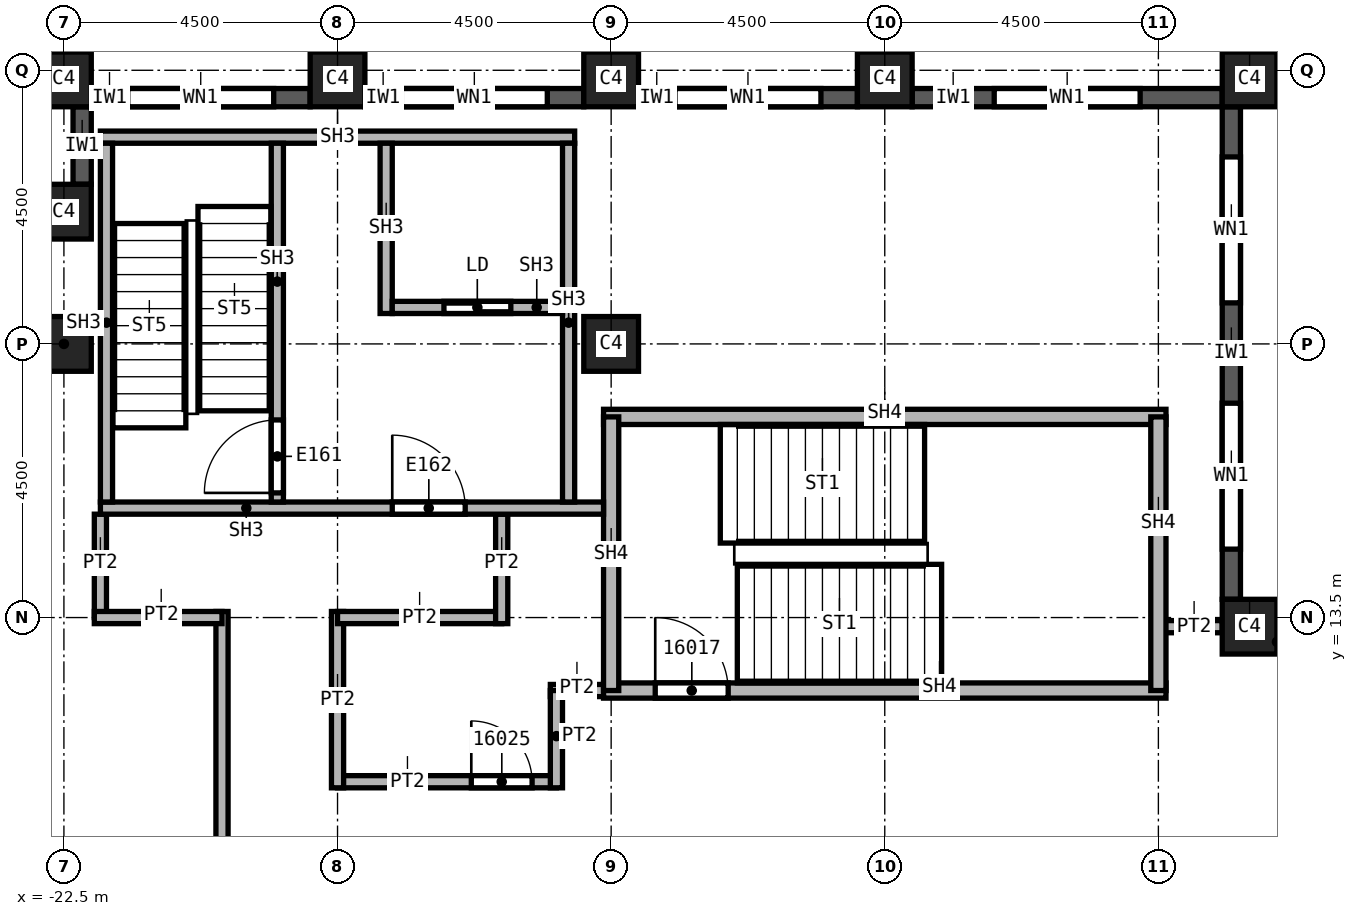
"""IFC4 building model, lengths in metres.
Left out: names, types, materials, properties, quantities, classifications, styles, units other than length and angle.
Written with IfcOpenShell. Run it as: python <this file> out.ifc"""

import sys

from ifc_helpers import new_model, si_unit, direction, frame, frame_2d, origin, origin_2d, place, context, subcontext, project, spatial, rectangle, extrude, element, fill, save


model = new_model("IFC4")
c1 = context("Model", 3, precision=1e-05, world=origin(), true_north=direction((0.0, 1.0)))
c2 = subcontext(c1, "Body", "Model", "MODEL_VIEW")
j1 = project(units=[si_unit("LENGTHUNIT", "METRE"), si_unit("PLANEANGLEUNIT", "RADIAN")], contexts=[c1])
p1 = place(None, origin())
s1 = spatial("IfcSite", under=j1, at=p1, CompositionType="ELEMENT")
p2 = place(p1, origin())
s2 = spatial("IfcBuilding", under=s1, at=p2, CompositionType="ELEMENT")
p3 = place(p2, frame((0.0, 0.0, 246.0)))
s3 = spatial("IfcBuildingStorey", under=s2, at=p3, CompositionType="ELEMENT", Elevation=246.0)
for number, where, z_axis, x_axis in (
    (1, (-13.5, 18.0, 0.0), (0.0, 0.0, 1.0), (1.0, 0.0, 0.0)),
    (2, (-22.5, 18.0, 0.0), (0.0, 0.0, 1.0), (1.0, 0.0, 0.0)),
    (3, (-3.0, 22.35, 0.0), (0.0, 0.0, 1.0), (1.0, 0.0, 0.0)),
    (4, (-9.0, 22.35, 0.0), (0.0, 0.0, 1.0), (1.0, 0.0, 0.0)),
    (5, (-13.5, 22.35, 0.0), (0.0, 0.0, 1.0), (1.0, 0.0, 0.0)),
    (6, (-18.0, 22.35, 0.0), (0.0, 0.0, 1.0), (1.0, 0.0, 0.0)),
    (7, (-22.5, 22.35, 0.0), (0.0, 0.0, 1.0), (1.0, 0.0, 0.0)),
    (8, (-3.0, 13.35, 0.0), (0.0, 0.0, 1.0), (1.0, 0.0, 0.0)),
    (9, (-22.5, 20.175, 0.0), (0.0, 0.0, 1.0), (1.0, 0.0, 0.0)),
):
    element("IfcColumn", number, at=place(p3, frame(where, z_axis=z_axis, x_axis=x_axis)), inside=s3, PredefinedType="COLUMN", context=c2, shape_type="SweptSolid", body=[
        extrude(rectangle(XDim=0.9, YDim=0.9, at=origin_2d()), origin(), (0.0, 0.0, 1.0), 3.72),
    ])
p4 = place(p3, frame((-3.3, 13.8, 0.0), z_axis=(0.0, 0.0, 1.0), x_axis=(0.0, 1.0, 0.0)))
e10 = element("IfcWall", 10, at=p4, inside=s3, PredefinedType="SOLIDWALL", context=c2, shape_type="SweptSolid", body=[
    extrude(rectangle(XDim=8.1, YDim=0.3, at=frame_2d((4.05, 0.0))), origin(), (0.0, 0.0, 1.0), 3.12),
])
p5 = place(p4, frame((0.825, 0.0, 0.8)))
e11 = element("IfcOpeningElement", 11, at=p5, cuts=e10, PredefinedType="OPENING", context=c2, shape_type="SweptSolid", body=[
    extrude(rectangle(XDim=2.4, YDim=1.95, at=frame_2d((1.2, 0.975))), frame((0.0, 0.15, 0.0), z_axis=(0.0, -1.0, 0.0), x_axis=(1.0, 0.0, 0.0)), (0.0, 0.0, 1.0), 0.3),
])
p6 = place(p4, frame((4.875, 0.0, 0.8)))
e12 = element("IfcOpeningElement", 12, at=p6, cuts=e10, PredefinedType="OPENING", context=c2, shape_type="SweptSolid", body=[
    extrude(rectangle(XDim=2.4, YDim=1.95, at=frame_2d((1.2, 0.975))), frame((0.0, 0.15, 0.0), z_axis=(0.0, -1.0, 0.0), x_axis=(1.0, 0.0, 0.0)), (0.0, 0.0, 1.0), 0.3),
])
p7 = place(p3, frame((-3.45, 22.05, 0.0), z_axis=(0.0, 0.0, 1.0), x_axis=(-1.0, 0.0, 0.0)))
e13 = element("IfcWall", 13, at=p7, inside=s3, PredefinedType="SOLIDWALL", context=c2, shape_type="SweptSolid", body=[
    extrude(rectangle(XDim=5.1, YDim=0.3, at=frame_2d((2.55, 0.0))), origin(), (0.0, 0.0, 1.0), 3.12),
])
p8 = place(p7, frame((1.35, 0.0, 0.8)))
e14 = element("IfcOpeningElement", 14, at=p8, cuts=e13, PredefinedType="OPENING", context=c2, shape_type="SweptSolid", body=[
    extrude(rectangle(XDim=2.4, YDim=1.95, at=frame_2d((1.2, 0.975))), frame((0.0, 0.15, 0.0), z_axis=(0.0, -1.0, 0.0), x_axis=(1.0, 0.0, 0.0)), (0.0, 0.0, 1.0), 0.3),
])
p9 = place(p3, frame((-9.45, 22.05, 0.0), z_axis=(0.0, 0.0, 1.0), x_axis=(-1.0, 0.0, 0.0)))
e15 = element("IfcWall", 15, at=p9, inside=s3, PredefinedType="SOLIDWALL", context=c2, shape_type="SweptSolid", body=[
    extrude(rectangle(XDim=3.6, YDim=0.3, at=frame_2d((1.8, 0.0))), origin(), (0.0, 0.0, 1.0), 3.12),
])
p10 = place(p9, frame((0.6, 0.0, 0.8)))
e16 = element("IfcOpeningElement", 16, at=p10, cuts=e15, PredefinedType="OPENING", context=c2, shape_type="SweptSolid", body=[
    extrude(rectangle(XDim=2.4, YDim=1.95, at=frame_2d((1.2, 0.975))), frame((0.0, 0.15, 0.0), z_axis=(0.0, -1.0, 0.0), x_axis=(1.0, 0.0, 0.0)), (0.0, 0.0, 1.0), 0.3),
])
p11 = place(p3, frame((-13.95, 22.05, 0.0), z_axis=(0.0, 0.0, 1.0), x_axis=(-1.0, 0.0, 0.0)))
e17 = element("IfcWall", 17, at=p11, inside=s3, PredefinedType="SOLIDWALL", context=c2, shape_type="SweptSolid", body=[
    extrude(rectangle(XDim=3.6, YDim=0.3, at=frame_2d((1.8, 0.0))), origin(), (0.0, 0.0, 1.0), 3.12),
])
p12 = place(p11, frame((0.6, 0.0, 0.8)))
e18 = element("IfcOpeningElement", 18, at=p12, cuts=e17, PredefinedType="OPENING", context=c2, shape_type="SweptSolid", body=[
    extrude(rectangle(XDim=2.4, YDim=1.95, at=frame_2d((1.2, 0.975))), frame((0.0, 0.15, 0.0), z_axis=(0.0, -1.0, 0.0), x_axis=(1.0, 0.0, 0.0)), (0.0, 0.0, 1.0), 0.3),
])
p13 = place(p3, frame((-18.45, 22.05, 0.0), z_axis=(0.0, 0.0, 1.0), x_axis=(-1.0, 0.0, 0.0)))
e19 = element("IfcWall", 19, at=p13, inside=s3, PredefinedType="SOLIDWALL", context=c2, shape_type="SweptSolid", body=[
    extrude(rectangle(XDim=3.6, YDim=0.3, at=frame_2d((1.8, 0.0))), origin(), (0.0, 0.0, 1.0), 3.12),
])
p14 = place(p13, frame((0.6, 0.0, 0.8)))
e20 = element("IfcOpeningElement", 20, at=p14, cuts=e19, PredefinedType="OPENING", context=c2, shape_type="SweptSolid", body=[
    extrude(rectangle(XDim=2.4, YDim=1.95, at=frame_2d((1.2, 0.975))), frame((0.0, 0.15, 0.0), z_axis=(0.0, -1.0, 0.0), x_axis=(1.0, 0.0, 0.0)), (0.0, 0.0, 1.0), 0.3),
])
p15 = place(p3, frame((-22.2, 21.9, 0.0), z_axis=(0.0, 0.0, 1.0), x_axis=(0.0, -1.0, 0.0)))
e21 = element("IfcWall", 21, at=p15, inside=s3, PredefinedType="SOLIDWALL", context=c2, shape_type="SweptSolid", body=[
    extrude(rectangle(XDim=1.275, YDim=0.3, at=frame_2d((0.637, 0.0))), origin(), (0.0, 0.0, 1.0), 3.12),
])
p16 = place(p3, frame((-21.9, 13.5, 0.0), z_axis=(0.0, 0.0, 1.0), x_axis=(0.0, 1.0, 0.0)))
e22 = element("IfcWall", 22, at=p16, inside=s3, PredefinedType="PARTITIONING", context=c2, shape_type="SweptSolid", body=[
    extrude(rectangle(XDim=1.7, YDim=0.2, at=frame_2d((0.85, 0.0))), origin(), (0.0, 0.0, 1.0), 3.72),
])
p17 = place(p3, frame((-19.9, -21.9, 0.0), z_axis=(0.0, 0.0, 1.0), x_axis=(0.0, 1.0, 0.0)))
e23 = element("IfcWall", 23, at=p17, inside=s3, PredefinedType="PARTITIONING", context=c2, shape_type="SweptSolid", body=[
    extrude(rectangle(XDim=35.5, YDim=0.2, at=frame_2d((17.75, 0.0))), origin(), (0.0, 0.0, 1.0), 3.72),
])
p18 = place(p17, frame((22.95, 0.0, 0.0)))
e24 = element("IfcOpeningElement", 24, at=p18, cuts=e23, PredefinedType="OPENING", context=c2, shape_type="SweptSolid", body=[
    extrude(rectangle(XDim=1.0, YDim=2.1, at=frame_2d((0.5, 1.05))), frame((0.0, 0.1, 0.0), z_axis=(0.0, -1.0, 0.0), x_axis=(1.0, 0.0, 0.0)), (0.0, 0.0, 1.0), 0.2),
])
p19 = place(p17, frame((28.8, 0.0, 0.0)))
e25 = element("IfcOpeningElement", 25, at=p19, cuts=e23, PredefinedType="OPENING", context=c2, shape_type="SweptSolid", body=[
    extrude(rectangle(XDim=1.0, YDim=2.1, at=frame_2d((0.5, 1.05))), frame((0.0, 0.1, 0.0), z_axis=(0.0, -1.0, 0.0), x_axis=(1.0, 0.0, 0.0)), (0.0, 0.0, 1.0), 0.2),
])
p20 = place(p17, frame((7.75, 0.0, 0.0)))
e26 = element("IfcOpeningElement", 26, at=p20, cuts=e23, PredefinedType="OPENING", context=c2, shape_type="SweptSolid", body=[
    extrude(rectangle(XDim=1.0, YDim=2.1, at=frame_2d((0.5, 1.05))), frame((0.0, 0.1, 0.0), z_axis=(0.0, -1.0, 0.0), x_axis=(1.0, 0.0, 0.0)), (0.0, 0.0, 1.0), 0.2),
])
p21 = place(p17, frame((17.85, 0.0, 0.0)))
e27 = element("IfcOpeningElement", 27, at=p21, cuts=e23, PredefinedType="OPENING", context=c2, shape_type="SweptSolid", body=[
    extrude(rectangle(XDim=1.0, YDim=2.1, at=frame_2d((0.5, 1.05))), frame((0.0, 0.1, 0.0), z_axis=(0.0, -1.0, 0.0), x_axis=(1.0, 0.0, 0.0)), (0.0, 0.0, 1.0), 0.2),
])
p22 = place(p3, frame((-19.9, 13.5, 0.0), z_axis=(0.0, 0.0, 1.0), x_axis=(-1.0, 0.0, 0.0)))
e28 = element("IfcWall", 28, at=p22, inside=s3, PredefinedType="PARTITIONING", context=c2, shape_type="SweptSolid", body=[
    extrude(rectangle(XDim=2.1, YDim=0.2, at=frame_2d((1.05, 0.0))), origin(), (0.0, 0.0, 1.0), 3.72),
])
p23 = place(p3, frame((-18.0, 10.8, 0.0), z_axis=(0.0, 0.0, 1.0), x_axis=(1.0, 0.0, 0.0)))
e29 = element("IfcWall", 29, at=p23, inside=s3, PredefinedType="PARTITIONING", context=c2, shape_type="SweptSolid", body=[
    extrude(rectangle(XDim=3.6, YDim=0.2, at=frame_2d((1.8, 0.0))), origin(), (0.0, 0.0, 1.0), 3.72),
])
p24 = place(p23, frame((2.2, 0.0, 0.0)))
e30 = element("IfcOpeningElement", 30, at=p24, cuts=e29, PredefinedType="OPENING", context=c2, shape_type="SweptSolid", body=[
    extrude(rectangle(XDim=1.0, YDim=2.1, at=frame_2d((0.5, 1.05))), frame((0.0, 0.1, 0.0), z_axis=(0.0, -1.0, 0.0), x_axis=(1.0, 0.0, 0.0)), (0.0, 0.0, 1.0), 0.2),
])
p25 = place(p3, frame((-18.0, 13.6, 0.0), z_axis=(0.0, 0.0, 1.0), x_axis=(0.0, -1.0, 0.0)))
e31 = element("IfcWall", 31, at=p25, inside=s3, PredefinedType="PARTITIONING", context=c2, shape_type="SweptSolid", body=[
    extrude(rectangle(XDim=2.9, YDim=0.2, at=frame_2d((1.45, 0.0))), origin(), (0.0, 0.0, 1.0), 3.72),
])
p26 = place(p3, frame((-15.3, 13.5, 0.0), z_axis=(0.0, 0.0, 1.0), x_axis=(-1.0, 0.0, 0.0)))
e32 = element("IfcWall", 32, at=p26, inside=s3, PredefinedType="PARTITIONING", context=c2, shape_type="SweptSolid", body=[
    extrude(rectangle(XDim=2.7, YDim=0.2, at=frame_2d((1.35, 0.0))), origin(), (0.0, 0.0, 1.0), 3.72),
])
p27 = place(p3, frame((-15.3, 15.2, 0.0), z_axis=(0.0, 0.0, 1.0), x_axis=(0.0, -1.0, 0.0)))
e33 = element("IfcWall", 33, at=p27, inside=s3, PredefinedType="PARTITIONING", context=c2, shape_type="SweptSolid", body=[
    extrude(rectangle(XDim=1.8, YDim=0.2, at=frame_2d((0.9, 0.0))), origin(), (0.0, 0.0, 1.0), 3.72),
])
p28 = place(p3, frame((-14.5, 12.3, 0.0), z_axis=(0.0, 0.0, 1.0), x_axis=(1.0, 0.0, 0.0)))
e34 = element("IfcWall", 34, at=p28, inside=s3, PredefinedType="PARTITIONING", context=c2, shape_type="SweptSolid", body=[
    extrude(rectangle(XDim=1.125, YDim=0.2, at=frame_2d((0.562, 0.0))), origin(), (0.0, 0.0, 1.0), 3.72),
])
p29 = place(p3, frame((-14.4, 10.7, 0.0), z_axis=(0.0, 0.0, 1.0), x_axis=(0.0, 1.0, 0.0)))
e35 = element("IfcWall", 35, at=p29, inside=s3, PredefinedType="PARTITIONING", context=c2, shape_type="SweptSolid", body=[
    extrude(rectangle(XDim=1.6, YDim=0.2, at=frame_2d((0.8, 0.0))), origin(), (0.0, 0.0, 1.0), 3.72),
])
p30 = place(p3, frame((-4.5, 13.35, 0.0), z_axis=(0.0, 0.0, 1.0), x_axis=(1.0, 0.0, 0.0)))
e36 = element("IfcWall", 36, at=p30, inside=s3, PredefinedType="PARTITIONING", context=c2, shape_type="SweptSolid", body=[
    extrude(rectangle(XDim=1.05, YDim=0.2, at=frame_2d((0.525, 0.0))), origin(), (0.0, 0.0, 1.0), 3.72),
])
p31 = place(p3, frame((-13.625, 12.3, 0.0), z_axis=(0.0, 0.0, 1.0), x_axis=(1.0, 0.0, 0.0)))
e37 = element("IfcWall", 37, at=p31, inside=s3, PredefinedType="SOLIDWALL", context=c2, shape_type="SweptSolid", body=[
    extrude(rectangle(XDim=9.25, YDim=0.25, at=frame_2d((4.625, 0.0))), origin(), (0.0, 0.0, 1.0), 3.72),
])
p32 = place(p31, frame((0.85, 0.0, 0.0)))
e38 = element("IfcOpeningElement", 38, at=p32, cuts=e37, PredefinedType="OPENING", context=c2, shape_type="SweptSolid", body=[
    extrude(rectangle(XDim=1.2, YDim=2.1, at=frame_2d((0.6, 1.05))), frame((0.0, 0.125, 0.0), z_axis=(0.0, -1.0, 0.0), x_axis=(1.0, 0.0, 0.0)), (0.0, 0.0, 1.0), 0.25),
])
p33 = place(p3, frame((-13.625, 16.8, 0.0), z_axis=(0.0, 0.0, 1.0), x_axis=(1.0, 0.0, 0.0)))
e39 = element("IfcWall", 39, at=p33, inside=s3, PredefinedType="SOLIDWALL", context=c2, shape_type="SweptSolid", body=[
    extrude(rectangle(XDim=9.25, YDim=0.25, at=frame_2d((4.625, 0.0))), origin(), (0.0, 0.0, 1.0), 3.72),
])
for number, where, z_axis, x_axis in (
    (40, (-13.5, 12.3, 0.0), (0.0, 0.0, 1.0), (0.0, 1.0, 0.0)),
    (41, (-4.5, 16.8, 0.0), (0.0, 0.0, 1.0), (0.0, -1.0, 0.0)),
):
    element("IfcWall", number, at=place(p3, frame(where, z_axis=z_axis, x_axis=x_axis)), inside=s3, PredefinedType="SOLIDWALL", context=c2, shape_type="SweptSolid", body=[
        extrude(rectangle(XDim=4.5, YDim=0.25, at=frame_2d((2.25, 0.0))), origin(), (0.0, 0.0, 1.0), 3.72),
    ])
p34 = place(p3, frame((-21.9, 15.3, 0.0), z_axis=(0.0, 0.0, 1.0), x_axis=(1.0, 0.0, 0.0)))
e42 = element("IfcWall", 42, at=p34, inside=s3, PredefinedType="SOLIDWALL", context=c2, shape_type="SweptSolid", body=[
    extrude(rectangle(XDim=8.275, YDim=0.2, at=frame_2d((4.137, 0.0))), origin(), (0.0, 0.0, 1.0), 3.72),
])
p35 = place(p34, frame((4.8, 0.0, 0.0)))
e43 = element("IfcOpeningElement", 43, at=p35, cuts=e42, PredefinedType="OPENING", context=c2, shape_type="SweptSolid", body=[
    extrude(rectangle(XDim=1.2, YDim=2.1, at=frame_2d((0.6, 1.05))), frame((0.0, 0.1, 0.0), z_axis=(0.0, -1.0, 0.0), x_axis=(1.0, 0.0, 0.0)), (0.0, 0.0, 1.0), 0.2),
])
p36 = place(p3, frame((-21.9, 21.4, 0.0), z_axis=(0.0, 0.0, 1.0), x_axis=(1.0, 0.0, 0.0)))
e44 = element("IfcWall", 44, at=p36, inside=s3, PredefinedType="SOLIDWALL", context=c2, shape_type="SweptSolid", body=[
    extrude(rectangle(XDim=7.8, YDim=0.2, at=frame_2d((3.9, 0.0))), origin(), (0.0, 0.0, 1.0), 3.72),
])
for number, where, z_axis, x_axis in (
    (45, (-21.8, 15.4, 0.0), (0.0, 0.0, 1.0), (0.0, 1.0, 0.0)),
    (46, (-14.2, 15.4, 0.0), (0.0, 0.0, 1.0), (0.0, 1.0, 0.0)),
):
    element("IfcWall", number, at=place(p3, frame(where, z_axis=z_axis, x_axis=x_axis)), inside=s3, PredefinedType="SOLIDWALL", context=c2, shape_type="SweptSolid", body=[
        extrude(rectangle(XDim=5.9, YDim=0.2, at=frame_2d((2.95, 0.0))), origin(), (0.0, 0.0, 1.0), 3.72),
    ])
p37 = place(p3, frame((-18.99, 15.4, 0.0), z_axis=(0.0, 0.0, 1.0), x_axis=(0.0, 1.0, 0.0)))
e47 = element("IfcWall", 47, at=p37, inside=s3, PredefinedType="SOLIDWALL", context=c2, shape_type="SweptSolid", body=[
    extrude(rectangle(XDim=5.9, YDim=0.2, at=frame_2d((2.95, 0.0))), origin(), (0.0, 0.0, 1.0), 3.72),
])
p38 = place(p37, frame((0.15, 0.0, 0.0)))
e48 = element("IfcOpeningElement", 48, at=p38, cuts=e47, PredefinedType="OPENING", context=c2, shape_type="SweptSolid", body=[
    extrude(rectangle(XDim=1.2, YDim=2.1, at=frame_2d((0.6, 1.05))), frame((0.0, 0.1, 0.0), z_axis=(0.0, -1.0, 0.0), x_axis=(1.0, 0.0, 0.0)), (0.0, 0.0, 1.0), 0.2),
])
p39 = place(p3, frame((-17.2, 18.5, 0.0), z_axis=(0.0, 0.0, 1.0), x_axis=(0.0, 1.0, 0.0)))
e49 = element("IfcWall", 49, at=p39, inside=s3, PredefinedType="SOLIDWALL", context=c2, shape_type="SweptSolid", body=[
    extrude(rectangle(XDim=2.8, YDim=0.2, at=frame_2d((1.4, 0.0))), origin(), (0.0, 0.0, 1.0), 3.72),
])
p40 = place(p3, frame((-17.1, 18.6, 0.0), z_axis=(0.0, 0.0, 1.0), x_axis=(1.0, 0.0, 0.0)))
e50 = element("IfcWall", 50, at=p40, inside=s3, PredefinedType="SOLIDWALL", context=c2, shape_type="SweptSolid", body=[
    extrude(rectangle(XDim=2.8, YDim=0.2, at=frame_2d((1.4, 0.0))), origin(), (0.0, 0.0, 1.0), 3.72),
])
p41 = place(p40, frame((0.85, 0.0, 0.0)))
e51 = element("IfcOpeningElement", 51, at=p41, cuts=e50, PredefinedType="OPENING", context=c2, shape_type="SweptSolid", body=[
    extrude(rectangle(XDim=1.1, YDim=2.1, at=frame_2d((0.55, 1.05))), frame((0.0, 0.1, 0.0), z_axis=(0.0, -1.0, 0.0), x_axis=(1.0, 0.0, 0.0)), (0.0, 0.0, 1.0), 0.2),
])
p42 = place(p5, origin())
e52 = element("IfcWindow", 52, at=p42, inside=s3, PartitioningType="SINGLE_PANEL", PredefinedType="WINDOW", context=c2, shape_type="SweptSolid", body=[
    extrude(rectangle(XDim=2.4, YDim=1.95, at=frame_2d((1.2, 0.975))), frame((0.0, 0.03, 0.0), z_axis=(0.0, -1.0, 0.0), x_axis=(1.0, 0.0, 0.0)), (0.0, 0.0, 1.0), 0.06),
])
fill(e11, e52)
p43 = place(p6, origin())
e53 = element("IfcWindow", 53, at=p43, inside=s3, PartitioningType="SINGLE_PANEL", PredefinedType="WINDOW", context=c2, shape_type="SweptSolid", body=[
    extrude(rectangle(XDim=2.4, YDim=1.95, at=frame_2d((1.2, 0.975))), frame((0.0, 0.03, 0.0), z_axis=(0.0, -1.0, 0.0), x_axis=(1.0, 0.0, 0.0)), (0.0, 0.0, 1.0), 0.06),
])
fill(e12, e53)
p44 = place(p8, origin())
e54 = element("IfcWindow", 54, at=p44, inside=s3, PartitioningType="SINGLE_PANEL", PredefinedType="WINDOW", context=c2, shape_type="SweptSolid", body=[
    extrude(rectangle(XDim=2.4, YDim=1.95, at=frame_2d((1.2, 0.975))), frame((0.0, 0.03, 0.0), z_axis=(0.0, -1.0, 0.0), x_axis=(1.0, 0.0, 0.0)), (0.0, 0.0, 1.0), 0.06),
])
fill(e14, e54)
p45 = place(p10, origin())
e55 = element("IfcWindow", 55, at=p45, inside=s3, PartitioningType="SINGLE_PANEL", PredefinedType="WINDOW", context=c2, shape_type="SweptSolid", body=[
    extrude(rectangle(XDim=2.4, YDim=1.95, at=frame_2d((1.2, 0.975))), frame((0.0, 0.03, 0.0), z_axis=(0.0, -1.0, 0.0), x_axis=(1.0, 0.0, 0.0)), (0.0, 0.0, 1.0), 0.06),
])
fill(e16, e55)
p46 = place(p12, origin())
e56 = element("IfcWindow", 56, at=p46, inside=s3, PartitioningType="SINGLE_PANEL", PredefinedType="WINDOW", context=c2, shape_type="SweptSolid", body=[
    extrude(rectangle(XDim=2.4, YDim=1.95, at=frame_2d((1.2, 0.975))), frame((0.0, 0.03, 0.0), z_axis=(0.0, -1.0, 0.0), x_axis=(1.0, 0.0, 0.0)), (0.0, 0.0, 1.0), 0.06),
])
fill(e18, e56)
p47 = place(p14, origin())
e57 = element("IfcWindow", 57, at=p47, inside=s3, PartitioningType="SINGLE_PANEL", PredefinedType="WINDOW", context=c2, shape_type="SweptSolid", body=[
    extrude(rectangle(XDim=2.4, YDim=1.95, at=frame_2d((1.2, 0.975))), frame((0.0, 0.03, 0.0), z_axis=(0.0, -1.0, 0.0), x_axis=(1.0, 0.0, 0.0)), (0.0, 0.0, 1.0), 0.06),
])
fill(e20, e57)
p48 = place(p32, origin())
e58 = element("IfcDoor", 58, at=p48, inside=s3, OperationType="SINGLE_SWING_RIGHT", PredefinedType="DOOR", context=c2, shape_type="SweptSolid", body=[
    extrude(rectangle(XDim=1.2, YDim=2.1, at=frame_2d((0.6, 1.05))), frame((0.0, 0.025, 0.0), z_axis=(0.0, -1.0, 0.0), x_axis=(1.0, 0.0, 0.0)), (0.0, 0.0, 1.0), 0.05),
])
fill(e38, e58)
p49 = place(p24, origin())
e59 = element("IfcDoor", 59, at=p49, inside=s3, OperationType="SINGLE_SWING_RIGHT", PredefinedType="DOOR", context=c2, shape_type="SweptSolid", body=[
    extrude(rectangle(XDim=1.0, YDim=2.1, at=frame_2d((0.5, 1.05))), frame((0.0, 0.025, 0.0), z_axis=(0.0, -1.0, 0.0), x_axis=(1.0, 0.0, 0.0)), (0.0, 0.0, 1.0), 0.05),
])
fill(e30, e59)
p50 = place(p38, origin())
e60 = element("IfcDoor", 60, at=p50, inside=s3, OperationType="SINGLE_SWING_LEFT", PredefinedType="DOOR", context=c2, shape_type="SweptSolid", body=[
    extrude(rectangle(XDim=1.2, YDim=2.1, at=frame_2d((0.6, 1.05))), frame((0.0, 0.025, 0.0), z_axis=(0.0, -1.0, 0.0), x_axis=(1.0, 0.0, 0.0)), (0.0, 0.0, 1.0), 0.05),
])
fill(e48, e60)
p51 = place(p41, origin())
e61 = element("IfcDoor", 61, at=p51, inside=s3, OperationType="SLIDING_TO_LEFT", PredefinedType="DOOR", context=c2, shape_type="SweptSolid", body=[
    extrude(rectangle(XDim=1.1, YDim=2.1, at=frame_2d((0.55, 1.05))), frame((0.0, 0.025, 0.0), z_axis=(0.0, -1.0, 0.0), x_axis=(1.0, 0.0, 0.0)), (0.0, 0.0, 1.0), 0.05),
])
fill(e51, e61)
p52 = place(p35, origin())
e62 = element("IfcDoor", 62, at=p52, inside=s3, OperationType="SINGLE_SWING_RIGHT", PredefinedType="DOOR", context=c2, shape_type="SweptSolid", body=[
    extrude(rectangle(XDim=1.2, YDim=2.1, at=frame_2d((0.6, 1.05))), frame((0.0, 0.025, 0.0), z_axis=(0.0, -1.0, 0.0), x_axis=(1.0, 0.0, 0.0)), (0.0, 0.0, 1.0), 0.05),
])
fill(e43, e62)
save(model, sys.argv[1])
